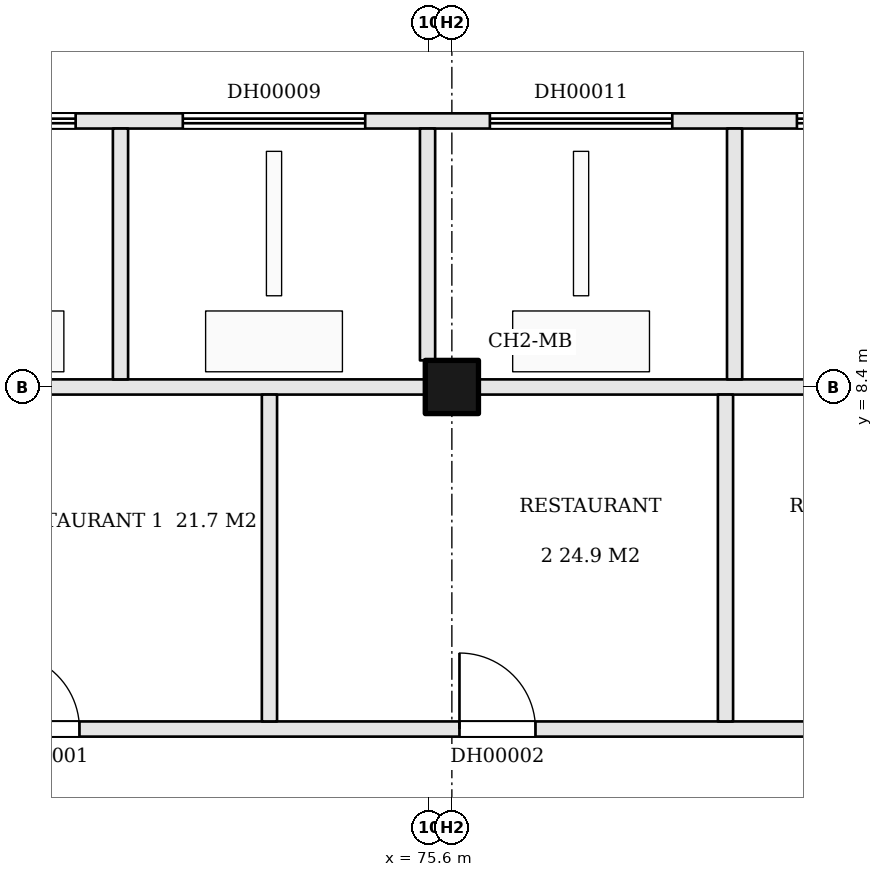
"""IFC4 building model, lengths in metres.
Left out: names, types, materials, properties, quantities, classifications, styles, units other than length and angle.
Written with IfcOpenShell. Run it as: python <this file> out.ifc"""

import sys

from ifc_helpers import new_model, si_unit, direction, frame, frame_2d, origin, origin_2d, place, context, subcontext, project, spatial, rectangle, extrude, element, fill, save


model = new_model("IFC4")
c1 = context("Model", 3, precision=1e-05, world=origin(), true_north=direction((0.0, 1.0)))
c2 = subcontext(c1, "Body", "Model", "MODEL_VIEW")
j1 = project(units=[si_unit("LENGTHUNIT", "METRE"), si_unit("PLANEANGLEUNIT", "RADIAN")], contexts=[c1])
p1 = place(None, origin())
s1 = spatial("IfcSite", under=j1, at=p1, CompositionType="ELEMENT")
p2 = place(p1, origin())
s2 = spatial("IfcBuilding", under=s1, at=p2, CompositionType="ELEMENT")
p3 = place(p2, origin())
s3 = spatial("IfcBuildingStorey", under=s2, at=p3, CompositionType="ELEMENT", Elevation=0.0)
p4 = place(p3, frame((75.9, 8.4, -0.2), z_axis=(0.0, 0.0, 1.0), x_axis=(1.0, 0.0, 0.0)))
e1 = element("IfcColumn", 1, at=p4, inside=s3, PredefinedType="COLUMN", context=c2, shape_type="SweptSolid", body=[
    extrude(rectangle(XDim=0.7, YDim=0.7, at=origin_2d()), origin(), (0.0, 0.0, 1.0), 8.9),
])
p5 = place(p3, frame((68.35, 3.9, 0.0), z_axis=(0.0, 0.0, 1.0), x_axis=(1.0, 0.0, 0.0)))
e2 = element("IfcWall", 2, at=p5, inside=s3, PredefinedType="PARTITIONING", context=c2, shape_type="SweptSolid", body=[
    extrude(rectangle(XDim=35.05, YDim=0.2, at=frame_2d((17.525, 0.0))), origin(), (0.0, 0.0, 1.0), 8.7),
])
p6 = place(p5, frame((1.65, 0.0, 0.0)))
e3 = element("IfcOpeningElement", 3, at=p6, cuts=e2, PredefinedType="OPENING", context=c2, shape_type="SweptSolid", body=[
    extrude(rectangle(XDim=1.0, YDim=2.1, at=frame_2d((0.5, 1.05))), frame((0.0, 0.11, 0.0), z_axis=(0.0, -1.0, 0.0), x_axis=(1.0, 0.0, 0.0)), (0.0, 0.0, 1.0), 0.22),
])
p7 = place(p5, frame((7.65, 0.0, 0.0)))
e4 = element("IfcOpeningElement", 4, at=p7, cuts=e2, PredefinedType="OPENING", context=c2, shape_type="SweptSolid", body=[
    extrude(rectangle(XDim=1.0, YDim=2.1, at=frame_2d((0.5, 1.05))), frame((0.0, 0.11, 0.0), z_axis=(0.0, -1.0, 0.0), x_axis=(1.0, 0.0, 0.0)), (0.0, 0.0, 1.0), 0.22),
])
p8 = place(p5, frame((13.65, 0.0, 0.0)))
e5 = element("IfcOpeningElement", 5, at=p8, cuts=e2, PredefinedType="OPENING", context=c2, shape_type="SweptSolid", body=[
    extrude(rectangle(XDim=1.0, YDim=2.1, at=frame_2d((0.5, 1.05))), frame((0.0, 0.11, 0.0), z_axis=(0.0, -1.0, 0.0), x_axis=(1.0, 0.0, 0.0)), (0.0, 0.0, 1.0), 0.22),
])
p9 = place(p5, frame((19.65, 0.0, 0.0)))
e6 = element("IfcOpeningElement", 6, at=p9, cuts=e2, PredefinedType="OPENING", context=c2, shape_type="SweptSolid", body=[
    extrude(rectangle(XDim=1.0, YDim=2.1, at=frame_2d((0.5, 1.05))), frame((0.0, 0.11, 0.0), z_axis=(0.0, -1.0, 0.0), x_axis=(1.0, 0.0, 0.0)), (0.0, 0.0, 1.0), 0.22),
])
p10 = place(p5, frame((25.65, 0.0, 0.0)))
e7 = element("IfcOpeningElement", 7, at=p10, cuts=e2, PredefinedType="OPENING", context=c2, shape_type="SweptSolid", body=[
    extrude(rectangle(XDim=1.0, YDim=2.1, at=frame_2d((0.5, 1.05))), frame((0.0, 0.11, 0.0), z_axis=(0.0, -1.0, 0.0), x_axis=(1.0, 0.0, 0.0)), (0.0, 0.0, 1.0), 0.22),
])
p11 = place(p5, frame((31.65, 0.0, 0.0)))
e8 = element("IfcOpeningElement", 8, at=p11, cuts=e2, PredefinedType="OPENING", context=c2, shape_type="SweptSolid", body=[
    extrude(rectangle(XDim=1.0, YDim=2.1, at=frame_2d((0.5, 1.05))), frame((0.0, 0.11, 0.0), z_axis=(0.0, -1.0, 0.0), x_axis=(1.0, 0.0, 0.0)), (0.0, 0.0, 1.0), 0.22),
])
p12 = place(p3, frame((69.05, 8.4, 0.0), z_axis=(0.0, 0.0, 1.0), x_axis=(1.0, 0.0, 0.0)))
e9 = element("IfcWall", 9, at=p12, inside=s3, PredefinedType="PARTITIONING", context=c2, shape_type="SweptSolid", body=[
    extrude(rectangle(XDim=6.5, YDim=0.2, at=frame_2d((3.25, 0.0))), origin(), (0.0, 0.0, 1.0), 8.7),
])
p13 = place(p3, frame((76.25, 8.4, 0.0), z_axis=(0.0, 0.0, 1.0), x_axis=(1.0, 0.0, 0.0)))
e10 = element("IfcWall", 10, at=p13, inside=s3, PredefinedType="PARTITIONING", context=c2, shape_type="SweptSolid", body=[
    extrude(rectangle(XDim=7.7, YDim=0.2, at=frame_2d((3.85, 0.0))), origin(), (0.0, 0.0, 1.0), 8.7),
])
p14 = place(p3, frame((68.35, 11.9, 0.0), z_axis=(0.0, 0.0, 1.0), x_axis=(1.0, 0.0, 0.0)))
e11 = element("IfcWall", 11, at=p14, inside=s3, PredefinedType="PARTITIONING", context=c2, shape_type="SweptSolid", body=[
    extrude(rectangle(XDim=39.45, YDim=0.2, at=frame_2d((19.725, 0.0))), origin(), (0.0, 0.0, 1.0), 8.7),
])
p15 = place(p14, frame((0.2, 0.0, 0.0)))
e12 = element("IfcOpeningElement", 12, at=p15, cuts=e11, PredefinedType="OPENING", context=c2, shape_type="SweptSolid", body=[
    extrude(rectangle(XDim=2.4, YDim=2.4, at=frame_2d((1.2, 1.2))), frame((0.0, 0.11, 0.0), z_axis=(0.0, -1.0, 0.0), x_axis=(1.0, 0.0, 0.0)), (0.0, 0.0, 1.0), 0.22),
])
p16 = place(p14, frame((4.01, 0.0, 0.0)))
e13 = element("IfcOpeningElement", 13, at=p16, cuts=e11, PredefinedType="OPENING", context=c2, shape_type="SweptSolid", body=[
    extrude(rectangle(XDim=2.4, YDim=2.4, at=frame_2d((1.2, 1.2))), frame((0.0, 0.11, 0.0), z_axis=(0.0, -1.0, 0.0), x_axis=(1.0, 0.0, 0.0)), (0.0, 0.0, 1.0), 0.22),
])
p17 = place(p14, frame((8.05, 0.0, 0.0)))
e14 = element("IfcOpeningElement", 14, at=p17, cuts=e11, PredefinedType="OPENING", context=c2, shape_type="SweptSolid", body=[
    extrude(rectangle(XDim=2.4, YDim=2.4, at=frame_2d((1.2, 1.2))), frame((0.0, 0.11, 0.0), z_axis=(0.0, -1.0, 0.0), x_axis=(1.0, 0.0, 0.0)), (0.0, 0.0, 1.0), 0.22),
])
p18 = place(p14, frame((12.09, 0.0, 0.0)))
e15 = element("IfcOpeningElement", 15, at=p18, cuts=e11, PredefinedType="OPENING", context=c2, shape_type="SweptSolid", body=[
    extrude(rectangle(XDim=2.4, YDim=2.4, at=frame_2d((1.2, 1.2))), frame((0.0, 0.11, 0.0), z_axis=(0.0, -1.0, 0.0), x_axis=(1.0, 0.0, 0.0)), (0.0, 0.0, 1.0), 0.22),
])
p19 = place(p14, frame((16.13, 0.0, 0.0)))
e16 = element("IfcOpeningElement", 16, at=p19, cuts=e11, PredefinedType="OPENING", context=c2, shape_type="SweptSolid", body=[
    extrude(rectangle(XDim=2.4, YDim=2.4, at=frame_2d((1.2, 1.2))), frame((0.0, 0.11, 0.0), z_axis=(0.0, -1.0, 0.0), x_axis=(1.0, 0.0, 0.0)), (0.0, 0.0, 1.0), 0.22),
])
p20 = place(p14, frame((20.17, 0.0, 0.0)))
e17 = element("IfcOpeningElement", 17, at=p20, cuts=e11, PredefinedType="OPENING", context=c2, shape_type="SweptSolid", body=[
    extrude(rectangle(XDim=2.4, YDim=2.4, at=frame_2d((1.2, 1.2))), frame((0.0, 0.11, 0.0), z_axis=(0.0, -1.0, 0.0), x_axis=(1.0, 0.0, 0.0)), (0.0, 0.0, 1.0), 0.22),
])
p21 = place(p14, frame((24.21, 0.0, 0.0)))
e18 = element("IfcOpeningElement", 18, at=p21, cuts=e11, PredefinedType="OPENING", context=c2, shape_type="SweptSolid", body=[
    extrude(rectangle(XDim=2.4, YDim=2.4, at=frame_2d((1.2, 1.2))), frame((0.0, 0.11, 0.0), z_axis=(0.0, -1.0, 0.0), x_axis=(1.0, 0.0, 0.0)), (0.0, 0.0, 1.0), 0.22),
])
p22 = place(p14, frame((28.25, 0.0, 0.0)))
e19 = element("IfcOpeningElement", 19, at=p22, cuts=e11, PredefinedType="OPENING", context=c2, shape_type="SweptSolid", body=[
    extrude(rectangle(XDim=2.4, YDim=2.4, at=frame_2d((1.2, 1.2))), frame((0.0, 0.11, 0.0), z_axis=(0.0, -1.0, 0.0), x_axis=(1.0, 0.0, 0.0)), (0.0, 0.0, 1.0), 0.22),
])
p23 = place(p14, frame((32.29, 0.0, 0.0)))
e20 = element("IfcOpeningElement", 20, at=p23, cuts=e11, PredefinedType="OPENING", context=c2, shape_type="SweptSolid", body=[
    extrude(rectangle(XDim=2.4, YDim=2.4, at=frame_2d((1.2, 1.2))), frame((0.0, 0.11, 0.0), z_axis=(0.0, -1.0, 0.0), x_axis=(1.0, 0.0, 0.0)), (0.0, 0.0, 1.0), 0.22),
])
p24 = place(p14, frame((36.33, 0.0, 0.0)))
e21 = element("IfcOpeningElement", 21, at=p24, cuts=e11, PredefinedType="OPENING", context=c2, shape_type="SweptSolid", body=[
    extrude(rectangle(XDim=2.4, YDim=2.4, at=frame_2d((1.2, 1.2))), frame((0.0, 0.11, 0.0), z_axis=(0.0, -1.0, 0.0), x_axis=(1.0, 0.0, 0.0)), (0.0, 0.0, 1.0), 0.22),
])
p25 = place(p3, frame((71.54, 8.5, 0.0), z_axis=(0.0, 0.0, 1.0), x_axis=(0.0, 1.0, 0.0)))
e22 = element("IfcWall", 22, at=p25, inside=s3, PredefinedType="PARTITIONING", context=c2, shape_type="SweptSolid", body=[
    extrude(rectangle(XDim=3.3, YDim=0.2, at=frame_2d((1.65, 0.0))), origin(), (0.0, 0.0, 1.0), 8.7),
])
p26 = place(p3, frame((73.5, 4.0, 0.0), z_axis=(0.0, 0.0, 1.0), x_axis=(0.0, 1.0, 0.0)))
e23 = element("IfcWall", 23, at=p26, inside=s3, PredefinedType="PARTITIONING", context=c2, shape_type="SweptSolid", body=[
    extrude(rectangle(XDim=4.3, YDim=0.2, at=frame_2d((2.15, 0.0))), origin(), (0.0, 0.0, 1.0), 8.7),
])
p27 = place(p3, frame((75.58, 8.75, 0.0), z_axis=(0.0, 0.0, 1.0), x_axis=(0.0, 1.0, 0.0)))
e24 = element("IfcWall", 24, at=p27, inside=s3, PredefinedType="PARTITIONING", context=c2, shape_type="SweptSolid", body=[
    extrude(rectangle(XDim=3.05, YDim=0.2, at=frame_2d((1.525, 0.0))), origin(), (0.0, 0.0, 1.0), 8.7),
])
p28 = place(p3, frame((79.5, 4.0, 0.0), z_axis=(0.0, 0.0, 1.0), x_axis=(0.0, 1.0, 0.0)))
e25 = element("IfcWall", 25, at=p28, inside=s3, PredefinedType="PARTITIONING", context=c2, shape_type="SweptSolid", body=[
    extrude(rectangle(XDim=4.3, YDim=0.2, at=frame_2d((2.15, 0.0))), origin(), (0.0, 0.0, 1.0), 8.7),
])
p29 = place(p3, frame((79.62, 8.5, 0.0), z_axis=(0.0, 0.0, 1.0), x_axis=(0.0, 1.0, 0.0)))
e26 = element("IfcWall", 26, at=p29, inside=s3, PredefinedType="PARTITIONING", context=c2, shape_type="SweptSolid", body=[
    extrude(rectangle(XDim=3.3, YDim=0.2, at=frame_2d((1.65, 0.0))), origin(), (0.0, 0.0, 1.0), 8.7),
])
p30 = place(p6, origin())
e27 = element("IfcDoor", 27, at=p30, inside=s3, OperationType="SINGLE_SWING_LEFT", PredefinedType="DOOR", context=c2, shape_type="SweptSolid", body=[
    extrude(rectangle(XDim=1.0, YDim=2.1, at=frame_2d((0.5, 1.05))), frame((0.0, 0.025, 0.0), z_axis=(0.0, -1.0, 0.0), x_axis=(1.0, 0.0, 0.0)), (0.0, 0.0, 1.0), 0.05),
])
fill(e3, e27)
p31 = place(p7, origin())
e28 = element("IfcDoor", 28, at=p31, inside=s3, OperationType="SINGLE_SWING_LEFT", PredefinedType="DOOR", context=c2, shape_type="SweptSolid", body=[
    extrude(rectangle(XDim=1.0, YDim=2.1, at=frame_2d((0.5, 1.05))), frame((0.0, 0.025, 0.0), z_axis=(0.0, -1.0, 0.0), x_axis=(1.0, 0.0, 0.0)), (0.0, 0.0, 1.0), 0.05),
])
fill(e4, e28)
p32 = place(p15, origin())
e29 = element("IfcDoor", 29, at=p32, inside=s3, OperationType="ROLLINGUP", PredefinedType="DOOR", context=c2, shape_type="SweptSolid", body=[
    extrude(rectangle(XDim=2.4, YDim=2.4, at=frame_2d((1.2, 1.2))), frame((0.0, 0.025, 0.0), z_axis=(0.0, -1.0, 0.0), x_axis=(1.0, 0.0, 0.0)), (0.0, 0.0, 1.0), 0.05),
])
fill(e12, e29)
p33 = place(p16, origin())
e30 = element("IfcDoor", 30, at=p33, inside=s3, OperationType="ROLLINGUP", PredefinedType="DOOR", context=c2, shape_type="SweptSolid", body=[
    extrude(rectangle(XDim=2.4, YDim=2.4, at=frame_2d((1.2, 1.2))), frame((0.0, 0.025, 0.0), z_axis=(0.0, -1.0, 0.0), x_axis=(1.0, 0.0, 0.0)), (0.0, 0.0, 1.0), 0.05),
])
fill(e13, e30)
p34 = place(p17, origin())
e31 = element("IfcDoor", 31, at=p34, inside=s3, OperationType="ROLLINGUP", PredefinedType="DOOR", context=c2, shape_type="SweptSolid", body=[
    extrude(rectangle(XDim=2.4, YDim=2.4, at=frame_2d((1.2, 1.2))), frame((0.0, 0.025, 0.0), z_axis=(0.0, -1.0, 0.0), x_axis=(1.0, 0.0, 0.0)), (0.0, 0.0, 1.0), 0.05),
])
fill(e14, e31)
p35 = place(p18, origin())
e32 = element("IfcDoor", 32, at=p35, inside=s3, OperationType="ROLLINGUP", PredefinedType="DOOR", context=c2, shape_type="SweptSolid", body=[
    extrude(rectangle(XDim=2.4, YDim=2.4, at=frame_2d((1.2, 1.2))), frame((0.0, 0.025, 0.0), z_axis=(0.0, -1.0, 0.0), x_axis=(1.0, 0.0, 0.0)), (0.0, 0.0, 1.0), 0.05),
])
fill(e15, e32)
save(model, sys.argv[1])
